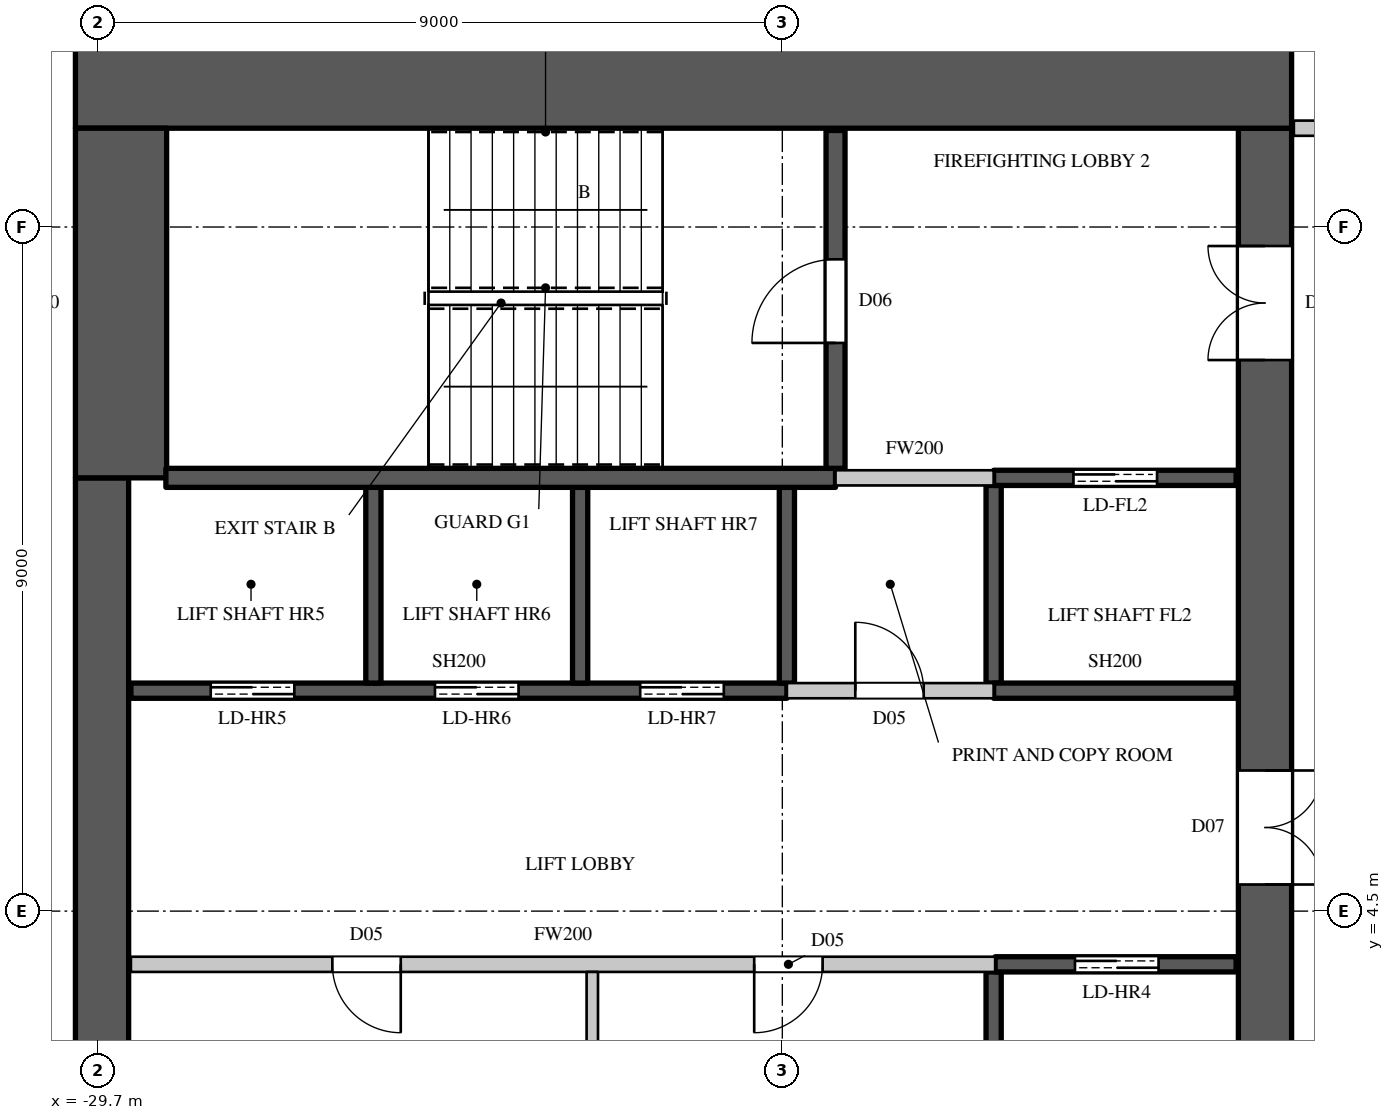
"""IFC4 building model, lengths in metres.
Left out: names, types, materials, properties, quantities, classifications, styles, units other than length and angle.
Written with IfcOpenShell. Run it as: python <this file> out.ifc"""

import sys

from ifc_helpers import new_model, si_unit, direction, frame, frame_2d, origin, place, context, subcontext, project, spatial, rectangle, extrude, element, fill, save


model = new_model("IFC4")
c1 = context("Model", 3, precision=1e-05, world=origin(), true_north=direction((0.0, 1.0)))
c2 = subcontext(c1, "Body", "Model", "MODEL_VIEW")
j1 = project(units=[si_unit("LENGTHUNIT", "METRE"), si_unit("PLANEANGLEUNIT", "RADIAN")], contexts=[c1])
p1 = place(None, origin())
s1 = spatial("IfcSite", under=j1, at=p1, CompositionType="ELEMENT")
p2 = place(p1, origin())
s2 = spatial("IfcBuilding", under=s1, at=p2, CompositionType="ELEMENT")
p3 = place(p2, frame((0.0, 0.0, 251.6)))
s3 = spatial("IfcBuildingStorey", under=s2, at=p3, CompositionType="ELEMENT", Elevation=251.6)
p4 = place(p3, frame((-30.0, 15.4, 0.0), z_axis=(0.0, 0.0, 1.0), x_axis=(1.0, 0.0, 0.0)))
e1 = element("IfcWall", 1, at=p4, inside=s3, PredefinedType="SHEAR", context=c2, shape_type="SweptSolid", body=[
    extrude(rectangle(XDim=16.0, YDim=1.2, at=frame_2d((8.0, 0.0))), origin(), (0.0, 0.0, 1.0), 4.1),
])
p5 = place(p3, frame((-14.35, -14.8, 0.0), z_axis=(0.0, 0.0, 1.0), x_axis=(0.0, 1.0, 0.0)))
e2 = element("IfcWall", 2, at=p5, inside=s3, PredefinedType="SHEAR", context=c2, shape_type="SweptSolid", body=[
    extrude(rectangle(XDim=29.6, YDim=0.7, at=frame_2d((14.8, 0.0))), origin(), (0.0, 0.0, 1.0), 4.1),
])
p6 = place(p5, frame((1.55, 0.0, 0.0)))
e3 = element("IfcOpeningElement", 3, at=p6, cuts=e2, PredefinedType="OPENING", context=c2, shape_type="SweptSolid", body=[
    extrude(rectangle(XDim=1.5, YDim=2.4, at=frame_2d((0.75, 1.2))), frame((0.0, 0.36, 0.0), z_axis=(0.0, -1.0, 0.0), x_axis=(1.0, 0.0, 0.0)), (0.0, 0.0, 1.0), 0.72),
])
p7 = place(p5, frame((26.55, 0.0, 0.0)))
e4 = element("IfcOpeningElement", 4, at=p7, cuts=e2, PredefinedType="OPENING", context=c2, shape_type="SweptSolid", body=[
    extrude(rectangle(XDim=1.5, YDim=2.4, at=frame_2d((0.75, 1.2))), frame((0.0, 0.36, 0.0), z_axis=(0.0, -1.0, 0.0), x_axis=(1.0, 0.0, 0.0)), (0.0, 0.0, 1.0), 0.72),
])
p8 = place(p5, frame((8.45, 0.0, 0.0)))
e5 = element("IfcOpeningElement", 5, at=p8, cuts=e2, PredefinedType="OPENING", context=c2, shape_type="SweptSolid", body=[
    extrude(rectangle(XDim=1.5, YDim=2.4, at=frame_2d((0.75, 1.2))), frame((0.0, 0.36, 0.0), z_axis=(0.0, -1.0, 0.0), x_axis=(1.0, 0.0, 0.0)), (0.0, 0.0, 1.0), 0.72),
])
p9 = place(p5, frame((19.65, 0.0, 0.0)))
e6 = element("IfcOpeningElement", 6, at=p9, cuts=e2, PredefinedType="OPENING", context=c2, shape_type="SweptSolid", body=[
    extrude(rectangle(XDim=1.5, YDim=2.4, at=frame_2d((0.75, 1.2))), frame((0.0, 0.36, 0.0), z_axis=(0.0, -1.0, 0.0), x_axis=(1.0, 0.0, 0.0)), (0.0, 0.0, 1.0), 0.72),
])
p10 = place(p5, frame((14.5, 0.0, 0.0)))
e7 = element("IfcOpeningElement", 7, at=p10, cuts=e2, PredefinedType="OPENING", context=c2, shape_type="SweptSolid", body=[
    extrude(rectangle(XDim=0.6, YDim=2.0, at=frame_2d((0.3, 1.0))), frame((0.0, 0.36, 0.0), z_axis=(0.0, -1.0, 0.0), x_axis=(1.0, 0.0, 0.0)), (0.0, 0.0, 1.0), 0.72),
])
p11 = place(p3, frame((-29.65, -10.2, 0.0), z_axis=(0.0, 0.0, 1.0), x_axis=(0.0, 1.0, 0.0)))
e8 = element("IfcWall", 8, at=p11, inside=s3, PredefinedType="SHEAR", context=c2, shape_type="SweptSolid", body=[
    extrude(rectangle(XDim=20.4, YDim=0.7, at=frame_2d((10.2, 0.0))), origin(), (0.0, 0.0, 1.0), 4.1),
])
p12 = place(p3, frame((-29.4, 10.2, 0.0), z_axis=(0.0, 0.0, 1.0), x_axis=(0.0, 1.0, 0.0)))
e9 = element("IfcWall", 9, at=p12, inside=s3, PredefinedType="SHEAR", context=c2, shape_type="SweptSolid", body=[
    extrude(rectangle(XDim=4.6, YDim=1.2, at=frame_2d((2.3, 0.0))), origin(), (0.0, 0.0, 1.0), 4.1),
])
p13 = place(p3, frame((-29.27, 3.8, 0.0), z_axis=(0.0, 0.0, 1.0), x_axis=(1.0, 0.0, 0.0)))
e10 = element("IfcWall", 10, at=p13, inside=s3, PredefinedType="PARTITIONING", context=c2, shape_type="SweptSolid", body=[
    extrude(rectangle(XDim=11.37, YDim=0.2, at=frame_2d((5.685, 0.0))), origin(), (0.0, 0.0, 1.0), 3.8),
])
p14 = place(p13, frame((2.65, 0.0, 0.0)))
e11 = element("IfcOpeningElement", 11, at=p14, cuts=e10, PredefinedType="OPENING", context=c2, shape_type="SweptSolid", body=[
    extrude(rectangle(XDim=0.9, YDim=2.2, at=frame_2d((0.45, 1.1))), frame((0.0, 0.11, 0.0), z_axis=(0.0, -1.0, 0.0), x_axis=(1.0, 0.0, 0.0)), (0.0, 0.0, 1.0), 0.22),
])
p15 = place(p13, frame((8.2, 0.0, 0.0)))
e12 = element("IfcOpeningElement", 12, at=p15, cuts=e10, PredefinedType="OPENING", context=c2, shape_type="SweptSolid", body=[
    extrude(rectangle(XDim=0.9, YDim=2.2, at=frame_2d((0.45, 1.1))), frame((0.0, 0.11, 0.0), z_axis=(0.0, -1.0, 0.0), x_axis=(1.0, 0.0, 0.0)), (0.0, 0.0, 1.0), 0.22),
])
p16 = place(p3, frame((-20.64, 7.4, 0.0), z_axis=(0.0, 0.0, 1.0), x_axis=(1.0, 0.0, 0.0)))
e13 = element("IfcWall", 13, at=p16, inside=s3, PredefinedType="PARTITIONING", context=c2, shape_type="SweptSolid", body=[
    extrude(rectangle(XDim=2.72, YDim=0.2, at=frame_2d((1.36, 0.0))), origin(), (0.0, 0.0, 1.0), 3.8),
])
p17 = place(p16, frame((0.9, 0.0, 0.0)))
e14 = element("IfcOpeningElement", 14, at=p17, cuts=e13, PredefinedType="OPENING", context=c2, shape_type="SweptSolid", body=[
    extrude(rectangle(XDim=0.9, YDim=2.2, at=frame_2d((0.45, 1.1))), frame((0.0, 0.11, 0.0), z_axis=(0.0, -1.0, 0.0), x_axis=(1.0, 0.0, 0.0)), (0.0, 0.0, 1.0), 0.22),
])
p18 = place(p3, frame((-20.0, 10.2, 0.0), z_axis=(0.0, 0.0, 1.0), x_axis=(1.0, 0.0, 0.0)))
e15 = element("IfcWall", 15, at=p18, inside=s3, PredefinedType="PARTITIONING", context=c2, shape_type="SweptSolid", body=[
    extrude(rectangle(XDim=2.08, YDim=0.2, at=frame_2d((1.04, 0.0))), origin(), (0.0, 0.0, 1.0), 3.8),
])
p19 = place(p3, frame((-13.97, 14.8, 0.0), z_axis=(0.0, 0.0, 1.0), x_axis=(1.0, 0.0, 0.0)))
e16 = element("IfcWall", 16, at=p19, inside=s3, PredefinedType="PARTITIONING", context=c2, shape_type="SweptSolid", body=[
    extrude(rectangle(XDim=2.87, YDim=0.2, at=frame_2d((1.435, 0.0))), origin(), (0.0, 0.0, 1.0), 3.8),
])
p20 = place(p3, frame((-23.2, 1.1, 0.0), z_axis=(0.0, 0.0, 1.0), x_axis=(0.0, 1.0, 0.0)))
e17 = element("IfcWall", 17, at=p20, inside=s3, PredefinedType="PARTITIONING", context=c2, shape_type="SweptSolid", body=[
    extrude(rectangle(XDim=2.6, YDim=0.15, at=frame_2d((1.3, 0.0))), origin(), (0.0, 0.0, 1.0), 3.8),
])
p21 = place(p3, frame((-29.27, 7.4, 0.0), z_axis=(0.0, 0.0, 1.0), x_axis=(1.0, 0.0, 0.0)))
e18 = element("IfcWall", 18, at=p21, inside=s3, PredefinedType="SHEAR", context=c2, shape_type="SweptSolid", body=[
    extrude(rectangle(XDim=8.63, YDim=0.2, at=frame_2d((4.315, 0.0))), origin(), (0.0, 0.0, 1.0), 3.8),
])
p22 = place(p21, frame((1.05, 0.0, 0.0)))
e19 = element("IfcOpeningElement", 19, at=p22, cuts=e18, PredefinedType="OPENING", context=c2, shape_type="SweptSolid", body=[
    extrude(rectangle(XDim=1.1, YDim=2.2, at=frame_2d((0.55, 1.1))), frame((0.0, 0.11, 0.0), z_axis=(0.0, -1.0, 0.0), x_axis=(1.0, 0.0, 0.0)), (0.0, 0.0, 1.0), 0.22),
])
p23 = place(p21, frame((4.0, 0.0, 0.0)))
e20 = element("IfcOpeningElement", 20, at=p23, cuts=e18, PredefinedType="OPENING", context=c2, shape_type="SweptSolid", body=[
    extrude(rectangle(XDim=1.1, YDim=2.2, at=frame_2d((0.55, 1.1))), frame((0.0, 0.11, 0.0), z_axis=(0.0, -1.0, 0.0), x_axis=(1.0, 0.0, 0.0)), (0.0, 0.0, 1.0), 0.22),
])
p24 = place(p21, frame((6.7, 0.0, 0.0)))
e21 = element("IfcOpeningElement", 21, at=p24, cuts=e18, PredefinedType="OPENING", context=c2, shape_type="SweptSolid", body=[
    extrude(rectangle(XDim=1.1, YDim=2.2, at=frame_2d((0.55, 1.1))), frame((0.0, 0.11, 0.0), z_axis=(0.0, -1.0, 0.0), x_axis=(1.0, 0.0, 0.0)), (0.0, 0.0, 1.0), 0.22),
])
for number, where, z_axis, x_axis in (
    (22, (-26.08, 7.5, 0.0), (0.0, 0.0, 1.0), (0.0, 1.0, 0.0)),
    (23, (-23.36, 7.5, 0.0), (0.0, 0.0, 1.0), (0.0, 1.0, 0.0)),
):
    element("IfcWall", number, at=place(p3, frame(where, z_axis=z_axis, x_axis=x_axis)), inside=s3, PredefinedType="SHEAR", context=c2, shape_type="SweptSolid", body=[
        extrude(rectangle(XDim=2.575, YDim=0.2, at=frame_2d((1.288, 0.0))), origin(), (0.0, 0.0, 1.0), 4.1),
    ])
p25 = place(p3, frame((-20.64, 7.5, 0.0), z_axis=(0.0, 0.0, 1.0), x_axis=(0.0, 1.0, 0.0)))
e24 = element("IfcWall", 24, at=p25, inside=s3, PredefinedType="SHEAR", context=c2, shape_type="SweptSolid", body=[
    extrude(rectangle(XDim=2.575, YDim=0.2, at=frame_2d((1.288, 0.0))), origin(), (0.0, 0.0, 1.0), 3.8),
])
p26 = place(p3, frame((-17.92, 1.1, 0.0), z_axis=(0.0, 0.0, 1.0), x_axis=(0.0, 1.0, 0.0)))
e25 = element("IfcWall", 25, at=p26, inside=s3, PredefinedType="SHEAR", context=c2, shape_type="SweptSolid", body=[
    extrude(rectangle(XDim=2.6, YDim=0.2, at=frame_2d((1.3, 0.0))), origin(), (0.0, 0.0, 1.0), 3.8),
])
p27 = place(p3, frame((-17.9, 3.8, 0.0), z_axis=(0.0, 0.0, 1.0), x_axis=(1.0, 0.0, 0.0)))
e26 = element("IfcWall", 26, at=p27, inside=s3, PredefinedType="SHEAR", context=c2, shape_type="SweptSolid", body=[
    extrude(rectangle(XDim=3.17, YDim=0.2, at=frame_2d((1.585, 0.0))), origin(), (0.0, 0.0, 1.0), 3.8),
])
p28 = place(p27, frame((1.05, 0.0, 0.0)))
e27 = element("IfcOpeningElement", 27, at=p28, cuts=e26, PredefinedType="OPENING", context=c2, shape_type="SweptSolid", body=[
    extrude(rectangle(XDim=1.1, YDim=2.2, at=frame_2d((0.55, 1.1))), frame((0.0, 0.11, 0.0), z_axis=(0.0, -1.0, 0.0), x_axis=(1.0, 0.0, 0.0)), (0.0, 0.0, 1.0), 0.22),
])
p29 = place(p3, frame((-17.92, 7.5, 0.0), z_axis=(0.0, 0.0, 1.0), x_axis=(0.0, 1.0, 0.0)))
e28 = element("IfcWall", 28, at=p29, inside=s3, PredefinedType="SHEAR", context=c2, shape_type="SweptSolid", body=[
    extrude(rectangle(XDim=2.6, YDim=0.2, at=frame_2d((1.3, 0.0))), origin(), (0.0, 0.0, 1.0), 3.8),
])
p30 = place(p3, frame((-17.92, 7.4, 0.0), z_axis=(0.0, 0.0, 1.0), x_axis=(1.0, 0.0, 0.0)))
e29 = element("IfcWall", 29, at=p30, inside=s3, PredefinedType="SHEAR", context=c2, shape_type="SweptSolid", body=[
    extrude(rectangle(XDim=3.19, YDim=0.2, at=frame_2d((1.595, 0.0))), origin(), (0.0, 0.0, 1.0), 3.8),
])
p31 = place(p3, frame((-17.92, 10.2, 0.0), z_axis=(0.0, 0.0, 1.0), x_axis=(1.0, 0.0, 0.0)))
e30 = element("IfcWall", 30, at=p31, inside=s3, PredefinedType="SHEAR", context=c2, shape_type="SweptSolid", body=[
    extrude(rectangle(XDim=3.19, YDim=0.2, at=frame_2d((1.595, 0.0))), origin(), (0.0, 0.0, 1.0), 3.8),
])
p32 = place(p31, frame((1.05, 0.0, 0.0)))
e31 = element("IfcOpeningElement", 31, at=p32, cuts=e30, PredefinedType="OPENING", context=c2, shape_type="SweptSolid", body=[
    extrude(rectangle(XDim=1.1, YDim=2.2, at=frame_2d((0.55, 1.1))), frame((0.0, 0.11, 0.0), z_axis=(0.0, -1.0, 0.0), x_axis=(1.0, 0.0, 0.0)), (0.0, 0.0, 1.0), 0.22),
])
p33 = place(p3, frame((-28.81, 10.2, 0.0), z_axis=(0.0, 0.0, 1.0), x_axis=(1.0, 0.0, 0.0)))
e32 = element("IfcWall", 32, at=p33, inside=s3, PredefinedType="SHEAR", context=c2, shape_type="SweptSolid", body=[
    extrude(rectangle(XDim=8.81, YDim=0.25, at=frame_2d((4.405, 0.0))), origin(), (0.0, 0.0, 1.0), 3.8),
])
p34 = place(p3, frame((-20.0, 10.325, 0.0), z_axis=(0.0, 0.0, 1.0), x_axis=(0.0, 1.0, 0.0)))
e33 = element("IfcWall", 33, at=p34, inside=s3, PredefinedType="SHEAR", context=c2, shape_type="SweptSolid", body=[
    extrude(rectangle(XDim=4.445, YDim=0.25, at=frame_2d((2.223, 0.0))), origin(), (0.0, 0.0, 1.0), 3.8),
])
p35 = place(p34, frame((1.65, 0.0, 0.0)))
e34 = element("IfcOpeningElement", 34, at=p35, cuts=e33, PredefinedType="OPENING", context=c2, shape_type="SweptSolid", body=[
    extrude(rectangle(XDim=1.1, YDim=2.2, at=frame_2d((0.55, 1.1))), frame((0.0, 0.135, 0.0), z_axis=(0.0, -1.0, 0.0), x_axis=(1.0, 0.0, 0.0)), (0.0, 0.0, 1.0), 0.27),
])
p36 = place(p35, origin())
e35 = element("IfcDoor", 35, at=p36, inside=s3, OperationType="SINGLE_SWING_LEFT", PredefinedType="DOOR", context=c2, shape_type="SweptSolid", body=[
    extrude(rectangle(XDim=1.1, YDim=2.2, at=frame_2d((0.55, 1.1))), frame((0.0, 0.025, 0.0), z_axis=(0.0, -1.0, 0.0), x_axis=(1.0, 0.0, 0.0)), (0.0, 0.0, 1.0), 0.05),
])
fill(e34, e35)
p37 = place(p14, origin())
e36 = element("IfcDoor", 36, at=p37, inside=s3, OperationType="SINGLE_SWING_LEFT", PredefinedType="DOOR", context=c2, shape_type="SweptSolid", body=[
    extrude(rectangle(XDim=0.9, YDim=2.2, at=frame_2d((0.45, 1.1))), frame((0.0, 0.025, 0.0), z_axis=(0.0, -1.0, 0.0), x_axis=(1.0, 0.0, 0.0)), (0.0, 0.0, 1.0), 0.05),
])
fill(e11, e36)
p38 = place(p15, origin())
e37 = element("IfcDoor", 37, at=p38, inside=s3, OperationType="SINGLE_SWING_RIGHT", PredefinedType="DOOR", context=c2, shape_type="SweptSolid", body=[
    extrude(rectangle(XDim=0.9, YDim=2.2, at=frame_2d((0.45, 1.1))), frame((0.0, 0.025, 0.0), z_axis=(0.0, -1.0, 0.0), x_axis=(1.0, 0.0, 0.0)), (0.0, 0.0, 1.0), 0.05),
])
fill(e12, e37)
p39 = place(p17, origin())
e38 = element("IfcDoor", 38, at=p39, inside=s3, OperationType="SINGLE_SWING_LEFT", PredefinedType="DOOR", context=c2, shape_type="SweptSolid", body=[
    extrude(rectangle(XDim=0.9, YDim=2.2, at=frame_2d((0.45, 1.1))), frame((0.0, 0.025, 0.0), z_axis=(0.0, -1.0, 0.0), x_axis=(1.0, 0.0, 0.0)), (0.0, 0.0, 1.0), 0.05),
])
fill(e14, e38)
p40 = place(p28, origin())
e39 = element("IfcDoor", 39, at=p40, inside=s3, OperationType="DOUBLE_DOOR_SLIDING", PredefinedType="DOOR", context=c2, shape_type="SweptSolid", body=[
    extrude(rectangle(XDim=1.1, YDim=2.2, at=frame_2d((0.55, 1.1))), frame((0.0, 0.025, 0.0), z_axis=(0.0, -1.0, 0.0), x_axis=(1.0, 0.0, 0.0)), (0.0, 0.0, 1.0), 0.05),
])
fill(e27, e39)
p41 = place(p22, origin())
e40 = element("IfcDoor", 40, at=p41, inside=s3, OperationType="DOUBLE_DOOR_SLIDING", PredefinedType="DOOR", context=c2, shape_type="SweptSolid", body=[
    extrude(rectangle(XDim=1.1, YDim=2.2, at=frame_2d((0.55, 1.1))), frame((0.0, 0.025, 0.0), z_axis=(0.0, -1.0, 0.0), x_axis=(1.0, 0.0, 0.0)), (0.0, 0.0, 1.0), 0.05),
])
fill(e19, e40)
p42 = place(p23, origin())
e41 = element("IfcDoor", 41, at=p42, inside=s3, OperationType="DOUBLE_DOOR_SLIDING", PredefinedType="DOOR", context=c2, shape_type="SweptSolid", body=[
    extrude(rectangle(XDim=1.1, YDim=2.2, at=frame_2d((0.55, 1.1))), frame((0.0, 0.025, 0.0), z_axis=(0.0, -1.0, 0.0), x_axis=(1.0, 0.0, 0.0)), (0.0, 0.0, 1.0), 0.05),
])
fill(e20, e41)
p43 = place(p24, origin())
e42 = element("IfcDoor", 42, at=p43, inside=s3, OperationType="DOUBLE_DOOR_SLIDING", PredefinedType="DOOR", context=c2, shape_type="SweptSolid", body=[
    extrude(rectangle(XDim=1.1, YDim=2.2, at=frame_2d((0.55, 1.1))), frame((0.0, 0.025, 0.0), z_axis=(0.0, -1.0, 0.0), x_axis=(1.0, 0.0, 0.0)), (0.0, 0.0, 1.0), 0.05),
])
fill(e21, e42)
p44 = place(p32, origin())
e43 = element("IfcDoor", 43, at=p44, inside=s3, OperationType="DOUBLE_DOOR_SLIDING", PredefinedType="DOOR", context=c2, shape_type="SweptSolid", body=[
    extrude(rectangle(XDim=1.1, YDim=2.2, at=frame_2d((0.55, 1.1))), frame((0.0, 0.025, 0.0), z_axis=(0.0, -1.0, 0.0), x_axis=(1.0, 0.0, 0.0)), (0.0, 0.0, 1.0), 0.05),
])
fill(e31, e43)
p45 = place(p7, origin())
e44 = element("IfcDoor", 44, at=p45, inside=s3, OperationType="DOUBLE_DOOR_SINGLE_SWING", PredefinedType="DOOR", context=c2, shape_type="SweptSolid", body=[
    extrude(rectangle(XDim=1.5, YDim=2.4, at=frame_2d((0.75, 1.2))), frame((0.0, 0.345, 0.0), z_axis=(0.0, -1.0, 0.0), x_axis=(1.0, 0.0, 0.0)), (0.0, 0.0, 1.0), 0.05),
])
fill(e4, e44)
p46 = place(p9, origin())
e45 = element("IfcDoor", 45, at=p46, inside=s3, OperationType="DOUBLE_DOOR_SINGLE_SWING", PredefinedType="DOOR", context=c2, shape_type="SweptSolid", body=[
    extrude(rectangle(XDim=1.5, YDim=2.4, at=frame_2d((0.75, 1.2))), frame((0.0, -0.295, 0.0), z_axis=(0.0, -1.0, 0.0), x_axis=(1.0, 0.0, 0.0)), (0.0, 0.0, 1.0), 0.05),
])
fill(e6, e45)
save(model, sys.argv[1])
